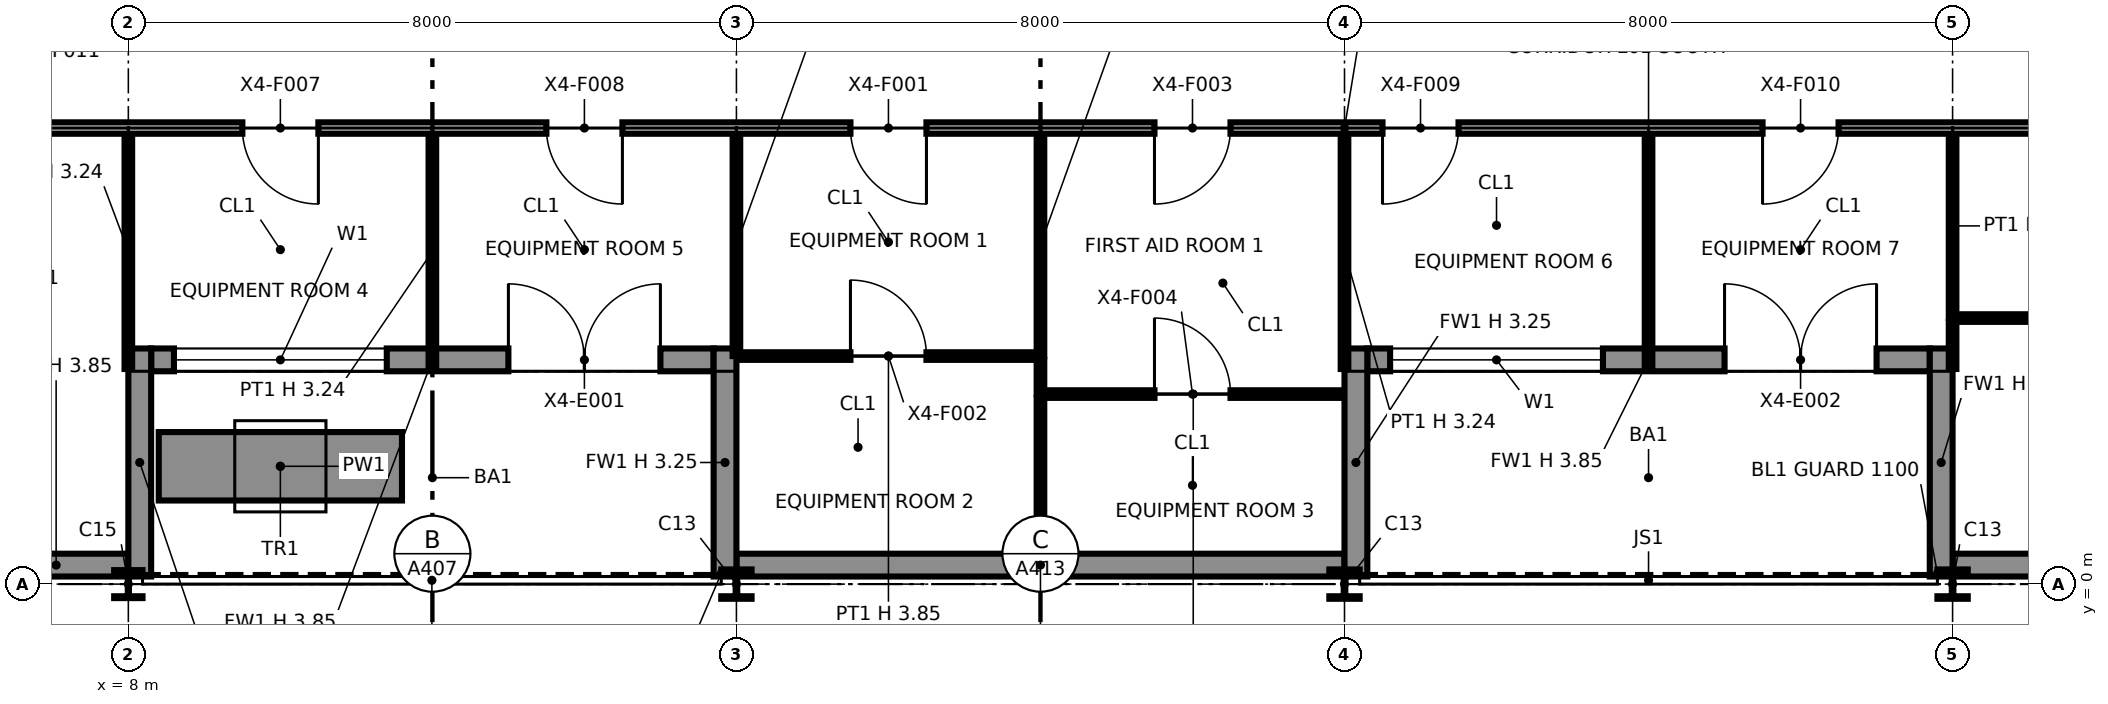
"""IFC4 building model, lengths in metres.
Left out: names, types, materials, properties, quantities, classifications, styles, units other than length and angle.
Written with IfcOpenShell. Run it as: python <this file> out.ifc"""

import sys

from ifc_helpers import new_model, si_unit, direction, frame, frame_2d, origin, origin_2d, place, context, subcontext, project, spatial, rectangle, i_section, extrude, element, fill, save


model = new_model("IFC4")
c1 = context("Model", 3, precision=1e-05, world=origin(), true_north=direction((0.0, 1.0)))
c2 = subcontext(c1, "Body", "Model", "MODEL_VIEW")
j1 = project(units=[si_unit("LENGTHUNIT", "METRE"), si_unit("PLANEANGLEUNIT", "RADIAN")], contexts=[c1])
p1 = place(None, origin())
s1 = spatial("IfcSite", under=j1, at=p1, CompositionType="ELEMENT")
p2 = place(p1, origin())
s2 = spatial("IfcBuilding", under=s1, at=p2, CompositionType="ELEMENT")
p3 = place(p2, frame((0.0, 0.0, 279.0)))
s3 = spatial("IfcBuildingStorey", under=s2, at=p3, CompositionType="ELEMENT", Elevation=279.0)
p4 = place(p3, frame((8.0, 0.0, 0.0), z_axis=(0.0, 0.0, 1.0), x_axis=(1.0, 0.0, 0.0)))
e1 = element("IfcColumn", 1, at=p4, inside=s3, PredefinedType="COLUMN", context=c2, shape_type="SweptSolid", body=[
    extrude(i_section(OverallWidth=0.373, OverallDepth=0.368, WebThickness=0.015, FlangeThickness=0.024, at=origin_2d()), origin(), (0.0, 0.0, 1.0), 3.85),
])
for number, where, z_axis, x_axis in (
    (2, (16.0, 0.0, 0.0), (0.0, 0.0, 1.0), (1.0, 0.0, 0.0)),
    (3, (24.0, 0.0, 0.0), (0.0, 0.0, 1.0), (1.0, 0.0, 0.0)),
    (4, (32.0, 0.0, 0.0), (0.0, 0.0, 1.0), (1.0, 0.0, 0.0)),
):
    element("IfcColumn", number, at=place(p3, frame(where, z_axis=z_axis, x_axis=x_axis)), inside=s3, PredefinedType="COLUMN", context=c2, shape_type="SweptSolid", body=[
        extrude(i_section(OverallWidth=0.399, OverallDepth=0.386, WebThickness=0.021, FlangeThickness=0.033, at=origin_2d()), origin(), (0.0, 0.0, 1.0), 3.85),
    ])
p5 = place(p3, frame((6.1, 0.25, 0.0), z_axis=(0.0, 0.0, 1.0), x_axis=(1.0, 0.0, 0.0)))
e5 = element("IfcWall", 5, at=p5, inside=s3, PredefinedType="SOLIDWALL", context=c2, shape_type="SweptSolid", body=[
    extrude(rectangle(XDim=1.9, YDim=0.3, at=frame_2d((0.95, 0.0))), origin(), (0.0, 0.0, 1.0), 3.85),
])
p6 = place(p3, frame((8.3, 2.95, 0.0), z_axis=(0.0, 0.0, 1.0), x_axis=(1.0, 0.0, 0.0)))
e6 = element("IfcWall", 6, at=p6, inside=s3, PredefinedType="SOLIDWALL", context=c2, shape_type="SweptSolid", body=[
    extrude(rectangle(XDim=7.4, YDim=0.3, at=frame_2d((3.7, 0.0))), origin(), (0.0, 0.0, 1.0), 3.85),
])
p7 = place(p6, frame((0.3, 0.0, 0.9)))
e7 = element("IfcOpeningElement", 7, at=p7, cuts=e6, PredefinedType="OPENING", context=c2, shape_type="SweptSolid", body=[
    extrude(rectangle(XDim=2.8, YDim=2.2, at=frame_2d((1.4, 1.1))), frame((0.0, 0.16, 0.0), z_axis=(0.0, -1.0, 0.0), x_axis=(1.0, 0.0, 0.0)), (0.0, 0.0, 1.0), 0.32),
])
p8 = place(p6, frame((4.7, 0.0, 0.0)))
e8 = element("IfcOpeningElement", 8, at=p8, cuts=e6, PredefinedType="OPENING", context=c2, shape_type="SweptSolid", body=[
    extrude(rectangle(XDim=2.0, YDim=2.4, at=frame_2d((1.0, 1.2))), frame((0.0, 0.16, 0.0), z_axis=(0.0, -1.0, 0.0), x_axis=(1.0, 0.0, 0.0)), (0.0, 0.0, 1.0), 0.32),
])
p9 = place(p3, frame((8.15, 0.1, 0.0), z_axis=(0.0, 0.0, 1.0), x_axis=(0.0, 1.0, 0.0)))
e9 = element("IfcWall", 9, at=p9, inside=s3, PredefinedType="SOLIDWALL", context=c2, shape_type="SweptSolid", body=[
    extrude(rectangle(XDim=3.0, YDim=0.3, at=frame_2d((1.5, 0.0))), origin(), (0.0, 0.0, 1.0), 3.237),
])
p10 = place(p3, frame((15.85, 0.1, 0.0), z_axis=(0.0, 0.0, 1.0), x_axis=(0.0, 1.0, 0.0)))
e10 = element("IfcWall", 10, at=p10, inside=s3, PredefinedType="SOLIDWALL", context=c2, shape_type="SweptSolid", body=[
    extrude(rectangle(XDim=3.0, YDim=0.3, at=frame_2d((1.5, 0.0))), origin(), (0.0, 0.0, 1.0), 3.247),
])
p11 = place(p3, frame((16.0, 0.25, 0.0), z_axis=(0.0, 0.0, 1.0), x_axis=(1.0, 0.0, 0.0)))
e11 = element("IfcWall", 11, at=p11, inside=s3, PredefinedType="SOLIDWALL", context=c2, shape_type="SweptSolid", body=[
    extrude(rectangle(XDim=8.0, YDim=0.3, at=frame_2d((4.0, 0.0))), origin(), (0.0, 0.0, 1.0), 3.85),
])
p12 = place(p3, frame((24.3, 2.95, 0.0), z_axis=(0.0, 0.0, 1.0), x_axis=(1.0, 0.0, 0.0)))
e12 = element("IfcWall", 12, at=p12, inside=s3, PredefinedType="SOLIDWALL", context=c2, shape_type="SweptSolid", body=[
    extrude(rectangle(XDim=7.4, YDim=0.3, at=frame_2d((3.7, 0.0))), origin(), (0.0, 0.0, 1.0), 3.85),
])
p13 = place(p12, frame((0.3, 0.0, 0.9)))
e13 = element("IfcOpeningElement", 13, at=p13, cuts=e12, PredefinedType="OPENING", context=c2, shape_type="SweptSolid", body=[
    extrude(rectangle(XDim=2.8, YDim=2.2, at=frame_2d((1.4, 1.1))), frame((0.0, 0.16, 0.0), z_axis=(0.0, -1.0, 0.0), x_axis=(1.0, 0.0, 0.0)), (0.0, 0.0, 1.0), 0.32),
])
p14 = place(p12, frame((4.7, 0.0, 0.0)))
e14 = element("IfcOpeningElement", 14, at=p14, cuts=e12, PredefinedType="OPENING", context=c2, shape_type="SweptSolid", body=[
    extrude(rectangle(XDim=2.0, YDim=2.4, at=frame_2d((1.0, 1.2))), frame((0.0, 0.16, 0.0), z_axis=(0.0, -1.0, 0.0), x_axis=(1.0, 0.0, 0.0)), (0.0, 0.0, 1.0), 0.32),
])
for number, where, z_axis, x_axis in (
    (15, (24.15, 0.1, 0.0), (0.0, 0.0, 1.0), (0.0, 1.0, 0.0)),
    (16, (31.85, 0.1, 0.0), (0.0, 0.0, 1.0), (0.0, 1.0, 0.0)),
):
    element("IfcWall", number, at=place(p3, frame(where, z_axis=z_axis, x_axis=x_axis)), inside=s3, PredefinedType="SOLIDWALL", context=c2, shape_type="SweptSolid", body=[
        extrude(rectangle(XDim=3.0, YDim=0.3, at=frame_2d((1.5, 0.0))), origin(), (0.0, 0.0, 1.0), 3.247),
    ])
p15 = place(p3, frame((32.0, 0.25, 0.0), z_axis=(0.0, 0.0, 1.0), x_axis=(1.0, 0.0, 0.0)))
e17 = element("IfcWall", 17, at=p15, inside=s3, PredefinedType="SOLIDWALL", context=c2, shape_type="SweptSolid", body=[
    extrude(rectangle(XDim=9.9, YDim=0.3, at=frame_2d((4.95, 0.0))), origin(), (0.0, 0.0, 1.0), 3.85),
])
p16 = place(p3, frame((8.4, 1.55, 0.0), z_axis=(0.0, 0.0, 1.0), x_axis=(1.0, 0.0, 0.0)))
e18 = element("IfcWall", 18, at=p16, inside=s3, PredefinedType="SOLIDWALL", context=c2, shape_type="SweptSolid", body=[
    extrude(rectangle(XDim=3.2, YDim=0.9, at=frame_2d((1.6, 0.0))), origin(), (0.0, 0.0, 1.0), 0.6),
])
p17 = place(p3, frame((20.0, 0.13, 0.0), z_axis=(0.0, 0.0, 1.0), x_axis=(0.0, 1.0, 0.0)))
e19 = element("IfcWall", 19, at=p17, inside=s3, PredefinedType="PARTITIONING", context=c2, shape_type="SweptSolid", body=[
    extrude(rectangle(XDim=2.32, YDim=0.1, at=frame_2d((1.16, 0.0))), origin(), (0.0, 0.0, 1.0), 3.85),
])
p18 = place(p3, frame((20.05, 2.5, 0.0), z_axis=(0.0, 0.0, 1.0), x_axis=(1.0, 0.0, 0.0)))
e20 = element("IfcWall", 20, at=p18, inside=s3, PredefinedType="PARTITIONING", context=c2, shape_type="SweptSolid", body=[
    extrude(rectangle(XDim=3.92, YDim=0.1, at=frame_2d((1.96, 0.0))), origin(), (0.0, 0.0, 1.0), 3.85),
])
p19 = place(p18, frame((1.45, 0.0, 0.0)))
e21 = element("IfcOpeningElement", 21, at=p19, cuts=e20, PredefinedType="OPENING", context=c2, shape_type="SweptSolid", body=[
    extrude(rectangle(XDim=1.0, YDim=2.1, at=frame_2d((0.5, 1.05))), frame((0.0, 0.06, 0.0), z_axis=(0.0, -1.0, 0.0), x_axis=(1.0, 0.0, 0.0)), (0.0, 0.0, 1.0), 0.12),
])
p20 = place(p3, frame((20.0, 2.5, 0.0), z_axis=(0.0, 0.0, 1.0), x_axis=(0.0, 1.0, 0.0)))
e22 = element("IfcWall", 22, at=p20, inside=s3, PredefinedType="PARTITIONING", context=c2, shape_type="SweptSolid", body=[
    extrude(rectangle(XDim=0.45, YDim=0.1, at=frame_2d((0.225, 0.0))), origin(), (0.0, 0.0, 1.0), 3.85),
])
for number, where, z_axis, x_axis in (
    (23, (8.0, 2.83, 0.0), (0.0, 0.0, 1.0), (0.0, 1.0, 0.0)),
    (24, (12.0, 2.83, 0.0), (0.0, 0.0, 1.0), (0.0, 1.0, 0.0)),
    (25, (24.0, 2.83, 0.0), (0.0, 0.0, 1.0), (0.0, 1.0, 0.0)),
    (26, (28.0, 2.83, 0.0), (0.0, 0.0, 1.0), (0.0, 1.0, 0.0)),
):
    element("IfcWall", number, at=place(p3, frame(where, z_axis=z_axis, x_axis=x_axis)), inside=s3, PredefinedType="PARTITIONING", context=c2, shape_type="SweptSolid", body=[
        extrude(rectangle(XDim=3.095, YDim=0.1, at=frame_2d((1.547, 0.0))), origin(), (0.0, 0.0, 1.0), 3.238),
    ])
p21 = place(p3, frame((32.0, 2.83, 0.0), z_axis=(0.0, 0.0, 1.0), x_axis=(0.0, 1.0, 0.0)))
e27 = element("IfcWall", 27, at=p21, inside=s3, PredefinedType="PARTITIONING", context=c2, shape_type="SweptSolid", body=[
    extrude(rectangle(XDim=0.62, YDim=0.1, at=frame_2d((0.31, 0.0))), origin(), (0.0, 0.0, 1.0), 3.238),
])
p22 = place(p3, frame((16.05, 3.0, 0.0), z_axis=(0.0, 0.0, 1.0), x_axis=(1.0, 0.0, 0.0)))
e28 = element("IfcWall", 28, at=p22, inside=s3, PredefinedType="PARTITIONING", context=c2, shape_type="SweptSolid", body=[
    extrude(rectangle(XDim=3.9, YDim=0.1, at=frame_2d((1.95, 0.0))), origin(), (0.0, 0.0, 1.0), 3.85),
])
p23 = place(p22, frame((1.45, 0.0, 0.0)))
e29 = element("IfcOpeningElement", 29, at=p23, cuts=e28, PredefinedType="OPENING", context=c2, shape_type="SweptSolid", body=[
    extrude(rectangle(XDim=1.0, YDim=2.1, at=frame_2d((0.5, 1.05))), frame((0.0, 0.06, 0.0), z_axis=(0.0, -1.0, 0.0), x_axis=(1.0, 0.0, 0.0)), (0.0, 0.0, 1.0), 0.12),
])
for number, where, z_axis, x_axis in (
    (30, (16.0, 3.0, 0.0), (0.0, 0.0, 1.0), (0.0, 1.0, 0.0)),
    (31, (20.0, 3.0, 0.0), (0.0, 0.0, 1.0), (0.0, 1.0, 0.0)),
):
    element("IfcWall", number, at=place(p3, frame(where, z_axis=z_axis, x_axis=x_axis)), inside=s3, PredefinedType="PARTITIONING", context=c2, shape_type="SweptSolid", body=[
        extrude(rectangle(XDim=2.925, YDim=0.1, at=frame_2d((1.462, 0.0))), origin(), (0.0, 0.0, 1.0), 3.238),
    ])
p24 = place(p3, frame((32.05, 3.5, 0.0), z_axis=(0.0, 0.0, 1.0), x_axis=(1.0, 0.0, 0.0)))
e32 = element("IfcWall", 32, at=p24, inside=s3, PredefinedType="PARTITIONING", context=c2, shape_type="SweptSolid", body=[
    extrude(rectangle(XDim=11.52, YDim=0.1, at=frame_2d((5.76, 0.0))), origin(), (0.0, 0.0, 1.0), 3.85),
])
p25 = place(p24, frame((6.4, 0.0, 0.0), z_axis=(0.0, 0.0, 1.0), x_axis=(-1.0, 0.0, 0.0)))
e33 = element("IfcOpeningElement", 33, at=p25, cuts=e32, PredefinedType="OPENING", context=c2, shape_type="SweptSolid", body=[
    extrude(rectangle(XDim=1.0, YDim=2.1, at=frame_2d((0.5, 1.05))), frame((0.0, 0.06, 0.0), z_axis=(0.0, -1.0, 0.0), x_axis=(1.0, 0.0, 0.0)), (0.0, 0.0, 1.0), 0.12),
])
p26 = place(p3, frame((32.0, 3.5, 0.0), z_axis=(0.0, 0.0, 1.0), x_axis=(0.0, 1.0, 0.0)))
e34 = element("IfcWall", 34, at=p26, inside=s3, PredefinedType="PARTITIONING", context=c2, shape_type="SweptSolid", body=[
    extrude(rectangle(XDim=2.425, YDim=0.1, at=frame_2d((1.212, 0.0))), origin(), (0.0, 0.0, 1.0), 3.238),
])
p27 = place(p3, frame((6.075, 6.0, 0.0), z_axis=(0.0, 0.0, 1.0), x_axis=(1.0, 0.0, 0.0)))
e35 = element("IfcWall", 35, at=p27, inside=s3, PredefinedType="PARTITIONING", context=c2, shape_type="SweptSolid", body=[
    extrude(rectangle(XDim=35.85, YDim=0.15, at=frame_2d((17.925, 0.0))), origin(), (0.0, 0.0, 1.0), 3.85),
])
p28 = place(p27, frame((12.425, 0.0, 0.0), z_axis=(0.0, 0.0, 1.0), x_axis=(-1.0, 0.0, 0.0)))
e36 = element("IfcOpeningElement", 36, at=p28, cuts=e35, PredefinedType="OPENING", context=c2, shape_type="SweptSolid", body=[
    extrude(rectangle(XDim=1.0, YDim=2.1, at=frame_2d((0.5, 1.05))), frame((0.0, 0.085, 0.0), z_axis=(0.0, -1.0, 0.0), x_axis=(1.0, 0.0, 0.0)), (0.0, 0.0, 1.0), 0.17),
])
p29 = place(p27, frame((16.425, 0.0, 0.0), z_axis=(0.0, 0.0, 1.0), x_axis=(-1.0, 0.0, 0.0)))
e37 = element("IfcOpeningElement", 37, at=p29, cuts=e35, PredefinedType="OPENING", context=c2, shape_type="SweptSolid", body=[
    extrude(rectangle(XDim=1.0, YDim=2.1, at=frame_2d((0.5, 1.05))), frame((0.0, 0.085, 0.0), z_axis=(0.0, -1.0, 0.0), x_axis=(1.0, 0.0, 0.0)), (0.0, 0.0, 1.0), 0.17),
])
p30 = place(p27, frame((30.425, 0.0, 0.0), z_axis=(0.0, 0.0, 1.0), x_axis=(-1.0, 0.0, 0.0)))
e38 = element("IfcOpeningElement", 38, at=p30, cuts=e35, PredefinedType="OPENING", context=c2, shape_type="SweptSolid", body=[
    extrude(rectangle(XDim=1.0, YDim=2.1, at=frame_2d((0.5, 1.05))), frame((0.0, 0.085, 0.0), z_axis=(0.0, -1.0, 0.0), x_axis=(1.0, 0.0, 0.0)), (0.0, 0.0, 1.0), 0.17),
])
p31 = place(p27, frame((4.425, 0.0, 0.0), z_axis=(0.0, 0.0, 1.0), x_axis=(-1.0, 0.0, 0.0)))
e39 = element("IfcOpeningElement", 39, at=p31, cuts=e35, PredefinedType="OPENING", context=c2, shape_type="SweptSolid", body=[
    extrude(rectangle(XDim=1.0, YDim=2.1, at=frame_2d((0.5, 1.05))), frame((0.0, 0.085, 0.0), z_axis=(0.0, -1.0, 0.0), x_axis=(1.0, 0.0, 0.0)), (0.0, 0.0, 1.0), 0.17),
])
p32 = place(p27, frame((8.425, 0.0, 0.0), z_axis=(0.0, 0.0, 1.0), x_axis=(-1.0, 0.0, 0.0)))
e40 = element("IfcOpeningElement", 40, at=p32, cuts=e35, PredefinedType="OPENING", context=c2, shape_type="SweptSolid", body=[
    extrude(rectangle(XDim=1.0, YDim=2.1, at=frame_2d((0.5, 1.05))), frame((0.0, 0.085, 0.0), z_axis=(0.0, -1.0, 0.0), x_axis=(1.0, 0.0, 0.0)), (0.0, 0.0, 1.0), 0.17),
])
p33 = place(p27, frame((19.425, 0.0, 0.0), z_axis=(0.0, 0.0, 1.0), x_axis=(-1.0, 0.0, 0.0)))
e41 = element("IfcOpeningElement", 41, at=p33, cuts=e35, PredefinedType="OPENING", context=c2, shape_type="SweptSolid", body=[
    extrude(rectangle(XDim=1.0, YDim=2.1, at=frame_2d((0.5, 1.05))), frame((0.0, 0.085, 0.0), z_axis=(0.0, -1.0, 0.0), x_axis=(1.0, 0.0, 0.0)), (0.0, 0.0, 1.0), 0.17),
])
p34 = place(p27, frame((24.425, 0.0, 0.0), z_axis=(0.0, 0.0, 1.0), x_axis=(-1.0, 0.0, 0.0)))
e42 = element("IfcOpeningElement", 42, at=p34, cuts=e35, PredefinedType="OPENING", context=c2, shape_type="SweptSolid", body=[
    extrude(rectangle(XDim=1.0, YDim=2.1, at=frame_2d((0.5, 1.05))), frame((0.0, 0.085, 0.0), z_axis=(0.0, -1.0, 0.0), x_axis=(1.0, 0.0, 0.0)), (0.0, 0.0, 1.0), 0.17),
])
p35 = place(p7, origin())
e43 = element("IfcWindow", 43, at=p35, inside=s3, PartitioningType="SINGLE_PANEL", PredefinedType="WINDOW", context=c2, shape_type="SweptSolid", body=[
    extrude(rectangle(XDim=2.8, YDim=2.2, at=frame_2d((1.4, 1.1))), frame((0.0, 0.03, 0.0), z_axis=(0.0, -1.0, 0.0), x_axis=(1.0, 0.0, 0.0)), (0.0, 0.0, 1.0), 0.06),
])
fill(e7, e43)
p36 = place(p8, origin())
e44 = element("IfcDoor", 44, at=p36, inside=s3, OperationType="DOUBLE_DOOR_SINGLE_SWING", PredefinedType="DOOR", context=c2, shape_type="SweptSolid", body=[
    extrude(rectangle(XDim=2.0, YDim=2.4, at=frame_2d((1.0, 1.2))), frame((0.0, 0.025, 0.0), z_axis=(0.0, -1.0, 0.0), x_axis=(1.0, 0.0, 0.0)), (0.0, 0.0, 1.0), 0.05),
])
fill(e8, e44)
p37 = place(p13, origin())
e45 = element("IfcWindow", 45, at=p37, inside=s3, PartitioningType="SINGLE_PANEL", PredefinedType="WINDOW", context=c2, shape_type="SweptSolid", body=[
    extrude(rectangle(XDim=2.8, YDim=2.2, at=frame_2d((1.4, 1.1))), frame((0.0, 0.03, 0.0), z_axis=(0.0, -1.0, 0.0), x_axis=(1.0, 0.0, 0.0)), (0.0, 0.0, 1.0), 0.06),
])
fill(e13, e45)
p38 = place(p14, origin())
e46 = element("IfcDoor", 46, at=p38, inside=s3, OperationType="DOUBLE_DOOR_SINGLE_SWING", PredefinedType="DOOR", context=c2, shape_type="SweptSolid", body=[
    extrude(rectangle(XDim=2.0, YDim=2.4, at=frame_2d((1.0, 1.2))), frame((0.0, 0.025, 0.0), z_axis=(0.0, -1.0, 0.0), x_axis=(1.0, 0.0, 0.0)), (0.0, 0.0, 1.0), 0.05),
])
fill(e14, e46)
p39 = place(p28, origin())
e47 = element("IfcDoor", 47, at=p39, inside=s3, OperationType="SINGLE_SWING_LEFT", PredefinedType="DOOR", context=c2, shape_type="SweptSolid", body=[
    extrude(rectangle(XDim=1.0, YDim=2.1, at=frame_2d((0.5, 1.05))), frame((0.0, 0.025, 0.0), z_axis=(0.0, -1.0, 0.0), x_axis=(1.0, 0.0, 0.0)), (0.0, 0.0, 1.0), 0.05),
])
fill(e36, e47)
p40 = place(p23, origin())
e48 = element("IfcDoor", 48, at=p40, inside=s3, OperationType="SINGLE_SWING_LEFT", PredefinedType="DOOR", context=c2, shape_type="SweptSolid", body=[
    extrude(rectangle(XDim=1.0, YDim=2.1, at=frame_2d((0.5, 1.05))), frame((0.0, 0.025, 0.0), z_axis=(0.0, -1.0, 0.0), x_axis=(1.0, 0.0, 0.0)), (0.0, 0.0, 1.0), 0.05),
])
fill(e29, e48)
p41 = place(p29, origin())
e49 = element("IfcDoor", 49, at=p41, inside=s3, OperationType="SINGLE_SWING_RIGHT", PredefinedType="DOOR", context=c2, shape_type="SweptSolid", body=[
    extrude(rectangle(XDim=1.0, YDim=2.1, at=frame_2d((0.5, 1.05))), frame((0.0, 0.025, 0.0), z_axis=(0.0, -1.0, 0.0), x_axis=(1.0, 0.0, 0.0)), (0.0, 0.0, 1.0), 0.05),
])
fill(e37, e49)
p42 = place(p19, origin())
e50 = element("IfcDoor", 50, at=p42, inside=s3, OperationType="SINGLE_SWING_LEFT", PredefinedType="DOOR", context=c2, shape_type="SweptSolid", body=[
    extrude(rectangle(XDim=1.0, YDim=2.1, at=frame_2d((0.5, 1.05))), frame((0.0, 0.025, 0.0), z_axis=(0.0, -1.0, 0.0), x_axis=(1.0, 0.0, 0.0)), (0.0, 0.0, 1.0), 0.05),
])
fill(e21, e50)
p43 = place(p31, origin())
e51 = element("IfcDoor", 51, at=p43, inside=s3, OperationType="SINGLE_SWING_LEFT", PredefinedType="DOOR", context=c2, shape_type="SweptSolid", body=[
    extrude(rectangle(XDim=1.0, YDim=2.1, at=frame_2d((0.5, 1.05))), frame((0.0, 0.025, 0.0), z_axis=(0.0, -1.0, 0.0), x_axis=(1.0, 0.0, 0.0)), (0.0, 0.0, 1.0), 0.05),
])
fill(e39, e51)
p44 = place(p32, origin())
e52 = element("IfcDoor", 52, at=p44, inside=s3, OperationType="SINGLE_SWING_LEFT", PredefinedType="DOOR", context=c2, shape_type="SweptSolid", body=[
    extrude(rectangle(XDim=1.0, YDim=2.1, at=frame_2d((0.5, 1.05))), frame((0.0, 0.025, 0.0), z_axis=(0.0, -1.0, 0.0), x_axis=(1.0, 0.0, 0.0)), (0.0, 0.0, 1.0), 0.05),
])
fill(e40, e52)
p45 = place(p33, origin())
e53 = element("IfcDoor", 53, at=p45, inside=s3, OperationType="SINGLE_SWING_RIGHT", PredefinedType="DOOR", context=c2, shape_type="SweptSolid", body=[
    extrude(rectangle(XDim=1.0, YDim=2.1, at=frame_2d((0.5, 1.05))), frame((0.0, 0.025, 0.0), z_axis=(0.0, -1.0, 0.0), x_axis=(1.0, 0.0, 0.0)), (0.0, 0.0, 1.0), 0.05),
])
fill(e41, e53)
p46 = place(p34, origin())
e54 = element("IfcDoor", 54, at=p46, inside=s3, OperationType="SINGLE_SWING_RIGHT", PredefinedType="DOOR", context=c2, shape_type="SweptSolid", body=[
    extrude(rectangle(XDim=1.0, YDim=2.1, at=frame_2d((0.5, 1.05))), frame((0.0, 0.025, 0.0), z_axis=(0.0, -1.0, 0.0), x_axis=(1.0, 0.0, 0.0)), (0.0, 0.0, 1.0), 0.05),
])
fill(e42, e54)
save(model, sys.argv[1])
